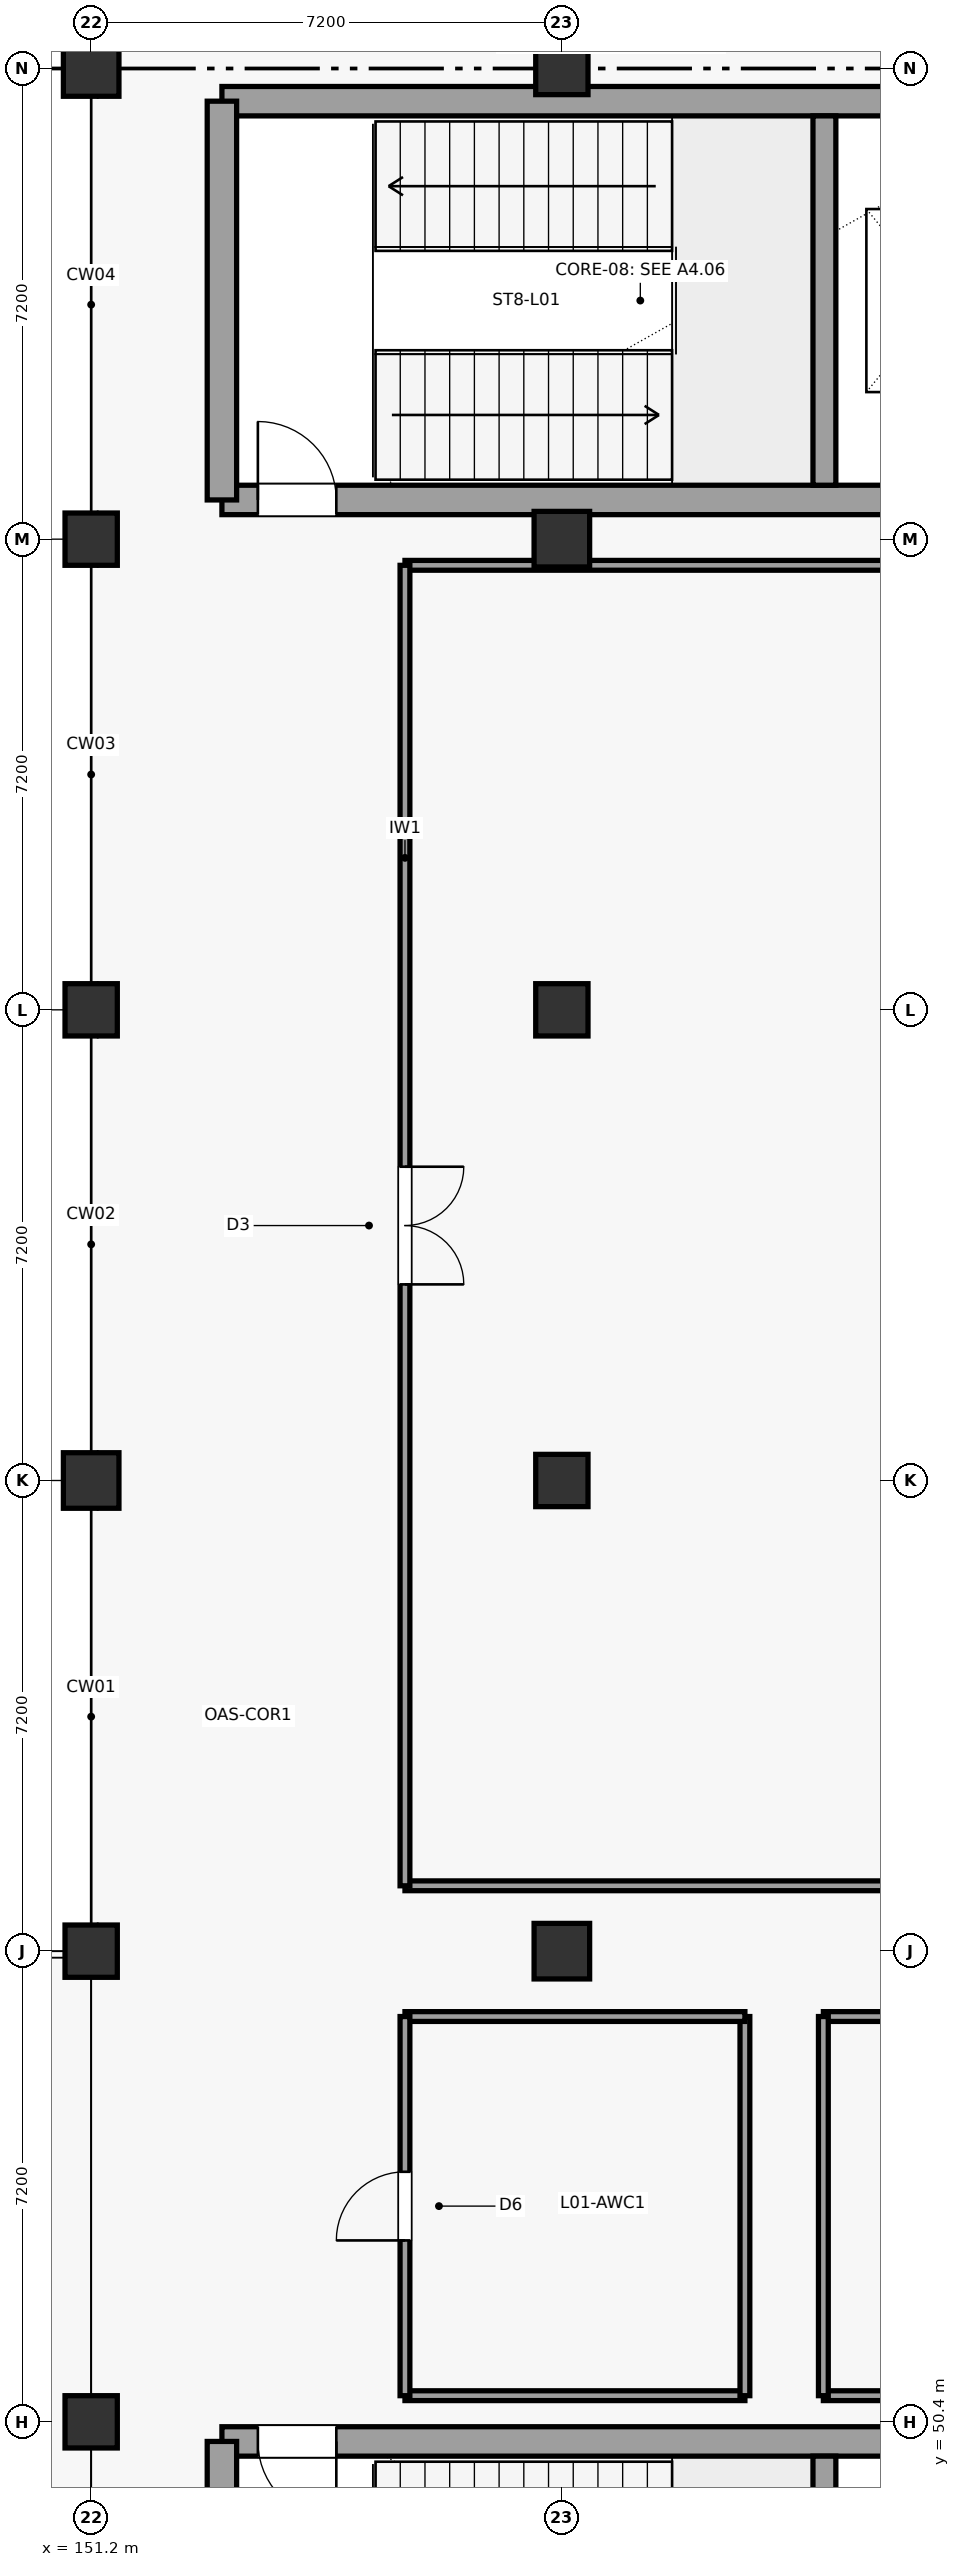
"""IFC4 building model, lengths in metres.
Left out: names, types, materials, properties, quantities, classifications, styles, units other than length and angle.
Written with IfcOpenShell. Run it as: python <this file> out.ifc"""

import sys

from ifc_helpers import new_model, si_unit, direction, frame, frame_2d, origin, origin_2d, place, context, subcontext, project, spatial, rectangle, circle, extrude, element, fill, save


model = new_model("IFC4")
c1 = context("Model", 3, precision=1e-05, world=origin(), true_north=direction((0.0, 1.0)))
c2 = subcontext(c1, "Body", "Model", "MODEL_VIEW")
j1 = project(units=[si_unit("LENGTHUNIT", "METRE"), si_unit("PLANEANGLEUNIT", "RADIAN")], contexts=[c1])
p1 = place(None, origin())
s1 = spatial("IfcSite", under=j1, at=p1, CompositionType="ELEMENT")
p2 = place(p1, origin())
s2 = spatial("IfcBuilding", under=s1, at=p2, CompositionType="ELEMENT")
p3 = place(p2, frame((0.0, 0.0, 5.4)))
s3 = spatial("IfcBuildingStorey", under=s2, at=p3, CompositionType="ELEMENT", Elevation=5.4)
p4 = place(p3, frame((151.2, 50.4, 0.0), z_axis=(0.0, 0.0, 1.0), x_axis=(1.0, 0.0, 0.0)))
e1 = element("IfcColumn", 1, at=p4, inside=s3, PredefinedType="COLUMN", context=c2, shape_type="SweptSolid", body=[
    extrude(rectangle(XDim=0.8, YDim=0.8, at=origin_2d()), origin(), (0.0, 0.0, 1.0), 4.2),
])
p5 = place(p3, frame((151.2, 57.6, 0.0), z_axis=(0.0, 0.0, 1.0), x_axis=(1.0, 0.0, 0.0)))
e2 = element("IfcColumn", 2, at=p5, inside=s3, PredefinedType="COLUMN", context=c2, shape_type="SweptSolid", body=[
    extrude(circle(Radius=0.4, at=origin_2d()), origin(), (0.0, 0.0, 1.0), 4.2),
])
p6 = place(p3, frame((151.2, 64.8, 0.0), z_axis=(0.0, 0.0, 1.0), x_axis=(1.0, 0.0, 0.0)))
e3 = element("IfcColumn", 3, at=p6, inside=s3, PredefinedType="COLUMN", context=c2, shape_type="SweptSolid", body=[
    extrude(rectangle(XDim=0.85, YDim=0.85, at=origin_2d()), origin(), (0.0, 0.0, 1.0), 4.2),
])
p7 = place(p3, frame((151.2, 72.0, 0.0), z_axis=(0.0, 0.0, 1.0), x_axis=(1.0, 0.0, 0.0)))
e4 = element("IfcColumn", 4, at=p7, inside=s3, PredefinedType="COLUMN", context=c2, shape_type="SweptSolid", body=[
    extrude(rectangle(XDim=0.8, YDim=0.8, at=origin_2d()), origin(), (0.0, 0.0, 1.0), 4.2),
])
p8 = place(p3, frame((151.2, 79.2, 0.0), z_axis=(0.0, 0.0, 1.0), x_axis=(1.0, 0.0, 0.0)))
e5 = element("IfcColumn", 5, at=p8, inside=s3, PredefinedType="COLUMN", context=c2, shape_type="SweptSolid", body=[
    extrude(circle(Radius=0.4, at=origin_2d()), origin(), (0.0, 0.0, 1.0), 4.2),
])
for number, where, z_axis, x_axis in (
    (6, (151.2, 86.4, 0.0), (0.0, 0.0, 1.0), (1.0, 0.0, 0.0)),
    (7, (158.4, 57.6, 0.0), (0.0, 0.0, 1.0), (1.0, 0.0, 0.0)),
):
    element("IfcColumn", number, at=place(p3, frame(where, z_axis=z_axis, x_axis=x_axis)), inside=s3, PredefinedType="COLUMN", context=c2, shape_type="SweptSolid", body=[
        extrude(rectangle(XDim=0.85, YDim=0.85, at=origin_2d()), origin(), (0.0, 0.0, 1.0), 4.2),
    ])
p9 = place(p3, frame((158.4, 64.8, 0.0), z_axis=(0.0, 0.0, 1.0), x_axis=(1.0, 0.0, 0.0)))
e8 = element("IfcColumn", 8, at=p9, inside=s3, PredefinedType="COLUMN", context=c2, shape_type="SweptSolid", body=[
    extrude(rectangle(XDim=0.8, YDim=0.8, at=origin_2d()), origin(), (0.0, 0.0, 1.0), 4.2),
])
p10 = place(p3, frame((158.4, 72.0, 0.0), z_axis=(0.0, 0.0, 1.0), x_axis=(1.0, 0.0, 0.0)))
e9 = element("IfcColumn", 9, at=p10, inside=s3, PredefinedType="COLUMN", context=c2, shape_type="SweptSolid", body=[
    extrude(circle(Radius=0.4, at=origin_2d()), origin(), (0.0, 0.0, 1.0), 4.2),
])
p11 = place(p3, frame((158.4, 79.2, 0.0), z_axis=(0.0, 0.0, 1.0), x_axis=(1.0, 0.0, 0.0)))
e10 = element("IfcColumn", 10, at=p11, inside=s3, PredefinedType="COLUMN", context=c2, shape_type="SweptSolid", body=[
    extrude(rectangle(XDim=0.85, YDim=0.85, at=origin_2d()), origin(), (0.0, 0.0, 1.0), 4.2),
])
p12 = place(p3, frame((158.4, 86.4, 0.0), z_axis=(0.0, 0.0, 1.0), x_axis=(1.0, 0.0, 0.0)))
e11 = element("IfcColumn", 11, at=p12, inside=s3, PredefinedType="COLUMN", context=c2, shape_type="SweptSolid", body=[
    extrude(rectangle(XDim=0.8, YDim=0.8, at=origin_2d()), origin(), (0.0, 0.0, 1.0), 4.2),
])
p13 = place(p3, frame((153.2, 50.1, 0.0), z_axis=(0.0, 0.0, 1.0), x_axis=(1.0, 0.0, 0.0)))
e12 = element("IfcWall", 12, at=p13, inside=s3, PredefinedType="SHEAR", context=c2, shape_type="SweptSolid", body=[
    extrude(rectangle(XDim=12.8, YDim=0.45, at=frame_2d((6.4, 0.0))), origin(), (0.0, 0.0, 1.0), 3.92),
])
p14 = place(p13, frame((0.55, 0.0, 0.0)))
e13 = element("IfcOpeningElement", 13, at=p14, cuts=e12, PredefinedType="OPENING", context=c2, shape_type="SweptSolid", body=[
    extrude(rectangle(XDim=1.2, YDim=2.25, at=frame_2d((0.6, 1.125))), frame((0.0, 0.235, 0.0), z_axis=(0.0, -1.0, 0.0), x_axis=(1.0, 0.0, 0.0)), (0.0, 0.0, 1.0), 0.47),
])
p15 = place(p13, frame((10.458, 0.0, 0.0)))
e14 = element("IfcOpeningElement", 14, at=p15, cuts=e12, PredefinedType="OPENING", context=c2, shape_type="SweptSolid", body=[
    extrude(rectangle(XDim=1.1, YDim=2.2, at=frame_2d((0.55, 1.1))), frame((0.0, 0.235, 0.0), z_axis=(0.0, -1.0, 0.0), x_axis=(1.0, 0.0, 0.0)), (0.0, 0.0, 1.0), 0.47),
])
p16 = place(p3, frame((153.2, 44.0, 0.0), z_axis=(0.0, 0.0, 1.0), x_axis=(0.0, 1.0, 0.0)))
e15 = element("IfcWall", 15, at=p16, inside=s3, PredefinedType="SHEAR", context=c2, shape_type="SweptSolid", body=[
    extrude(rectangle(XDim=6.1, YDim=0.45, at=frame_2d((3.05, 0.0))), origin(), (0.0, 0.0, 1.0), 3.92),
])
p17 = place(p3, frame((162.416, 44.225, 0.0), z_axis=(0.0, 0.0, 1.0), x_axis=(0.0, 1.0, 0.0)))
e16 = element("IfcWall", 16, at=p17, inside=s3, PredefinedType="SHEAR", context=c2, shape_type="SweptSolid", body=[
    extrude(rectangle(XDim=5.65, YDim=0.35, at=frame_2d((2.825, 0.0))), origin(), (0.0, 0.0, 1.0), 3.92),
])
p18 = place(p3, frame((153.2, 79.8, 0.0), z_axis=(0.0, 0.0, 1.0), x_axis=(1.0, 0.0, 0.0)))
e17 = element("IfcWall", 17, at=p18, inside=s3, PredefinedType="SHEAR", context=c2, shape_type="SweptSolid", body=[
    extrude(rectangle(XDim=12.8, YDim=0.45, at=frame_2d((6.4, 0.0))), origin(), (0.0, 0.0, 1.0), 3.92),
])
p19 = place(p18, frame((0.55, 0.0, 0.0)))
e18 = element("IfcOpeningElement", 18, at=p19, cuts=e17, PredefinedType="OPENING", context=c2, shape_type="SweptSolid", body=[
    extrude(rectangle(XDim=1.2, YDim=2.25, at=frame_2d((0.6, 1.125))), frame((0.0, 0.235, 0.0), z_axis=(0.0, -1.0, 0.0), x_axis=(1.0, 0.0, 0.0)), (0.0, 0.0, 1.0), 0.47),
])
p20 = place(p18, frame((10.108, 0.0, 0.0)))
e19 = element("IfcOpeningElement", 19, at=p20, cuts=e17, PredefinedType="OPENING", context=c2, shape_type="SweptSolid", body=[
    extrude(rectangle(XDim=1.8, YDim=2.4, at=frame_2d((0.9, 1.2))), frame((0.0, 0.235, 0.0), z_axis=(0.0, -1.0, 0.0), x_axis=(1.0, 0.0, 0.0)), (0.0, 0.0, 1.0), 0.47),
])
p21 = place(p3, frame((153.2, 85.9, 0.0), z_axis=(0.0, 0.0, 1.0), x_axis=(1.0, 0.0, 0.0)))
e20 = element("IfcWall", 20, at=p21, inside=s3, PredefinedType="SHEAR", context=c2, shape_type="SweptSolid", body=[
    extrude(rectangle(XDim=12.8, YDim=0.45, at=frame_2d((6.4, 0.0))), origin(), (0.0, 0.0, 1.0), 3.92),
])
p22 = place(p3, frame((153.2, 79.8, 0.0), z_axis=(0.0, 0.0, 1.0), x_axis=(0.0, 1.0, 0.0)))
e21 = element("IfcWall", 21, at=p22, inside=s3, PredefinedType="SHEAR", context=c2, shape_type="SweptSolid", body=[
    extrude(rectangle(XDim=6.1, YDim=0.45, at=frame_2d((3.05, 0.0))), origin(), (0.0, 0.0, 1.0), 3.92),
])
p23 = place(p3, frame((162.416, 80.025, 0.0), z_axis=(0.0, 0.0, 1.0), x_axis=(0.0, 1.0, 0.0)))
e22 = element("IfcWall", 22, at=p23, inside=s3, PredefinedType="SHEAR", context=c2, shape_type="SweptSolid", body=[
    extrude(rectangle(XDim=5.65, YDim=0.35, at=frame_2d((2.825, 0.0))), origin(), (0.0, 0.0, 1.0), 3.92),
])
for number, where, z_axis, x_axis in (
    (23, (156.0, 58.6, 0.0), (0.0, 0.0, 1.0), (1.0, 0.0, 0.0)),
    (24, (171.4, 78.8, 0.0), (0.0, 0.0, 1.0), (-1.0, 0.0, 0.0)),
):
    element("IfcWall", number, at=place(p3, frame(where, z_axis=z_axis, x_axis=x_axis)), inside=s3, PredefinedType="PARTITIONING", context=c2, shape_type="SweptSolid", body=[
        extrude(rectangle(XDim=15.4, YDim=0.15, at=frame_2d((7.7, 0.0))), origin(), (0.0, 0.0, 1.0), 2.98),
    ])
p24 = place(p3, frame((156.0, 78.8, 0.0), z_axis=(0.0, 0.0, 1.0), x_axis=(0.0, -1.0, 0.0)))
e25 = element("IfcWall", 25, at=p24, inside=s3, PredefinedType="PARTITIONING", context=c2, shape_type="SweptSolid", body=[
    extrude(rectangle(XDim=20.2, YDim=0.15, at=frame_2d((10.1, 0.0))), origin(), (0.0, 0.0, 1.0), 2.98),
])
p25 = place(p24, frame((9.2, 0.0, 0.0)))
e26 = element("IfcOpeningElement", 26, at=p25, cuts=e25, PredefinedType="OPENING", context=c2, shape_type="SweptSolid", body=[
    extrude(rectangle(XDim=1.8, YDim=2.3, at=frame_2d((0.9, 1.15))), frame((0.0, 0.085, 0.0), z_axis=(0.0, -1.0, 0.0), x_axis=(1.0, 0.0, 0.0)), (0.0, 0.0, 1.0), 0.17),
])
p26 = place(p3, frame((156.0, 50.8, 0.0), z_axis=(0.0, 0.0, 1.0), x_axis=(1.0, 0.0, 0.0)))
e27 = element("IfcWall", 27, at=p26, inside=s3, PredefinedType="PARTITIONING", context=c2, shape_type="SweptSolid", body=[
    extrude(rectangle(XDim=5.2, YDim=0.15, at=frame_2d((2.6, 0.0))), origin(), (0.0, 0.0, 1.0), 2.98),
])
p27 = place(p3, frame((161.2, 50.8, 0.0), z_axis=(0.0, 0.0, 1.0), x_axis=(0.0, 1.0, 0.0)))
e28 = element("IfcWall", 28, at=p27, inside=s3, PredefinedType="PARTITIONING", context=c2, shape_type="SweptSolid", body=[
    extrude(rectangle(XDim=5.8, YDim=0.15, at=frame_2d((2.9, 0.0))), origin(), (0.0, 0.0, 1.0), 2.98),
])
p28 = place(p3, frame((161.2, 56.6, 0.0), z_axis=(0.0, 0.0, 1.0), x_axis=(-1.0, 0.0, 0.0)))
e29 = element("IfcWall", 29, at=p28, inside=s3, PredefinedType="PARTITIONING", context=c2, shape_type="SweptSolid", body=[
    extrude(rectangle(XDim=5.2, YDim=0.15, at=frame_2d((2.6, 0.0))), origin(), (0.0, 0.0, 1.0), 2.98),
])
p29 = place(p3, frame((156.0, 56.6, 0.0), z_axis=(0.0, 0.0, 1.0), x_axis=(0.0, -1.0, 0.0)))
e30 = element("IfcWall", 30, at=p29, inside=s3, PredefinedType="PARTITIONING", context=c2, shape_type="SweptSolid", body=[
    extrude(rectangle(XDim=5.8, YDim=0.15, at=frame_2d((2.9, 0.0))), origin(), (0.0, 0.0, 1.0), 2.98),
])
p30 = place(p29, frame((2.375, 0.0, 0.0)))
e31 = element("IfcOpeningElement", 31, at=p30, cuts=e30, PredefinedType="OPENING", context=c2, shape_type="SweptSolid", body=[
    extrude(rectangle(XDim=1.05, YDim=2.2, at=frame_2d((0.525, 1.1))), frame((0.0, 0.085, 0.0), z_axis=(0.0, -1.0, 0.0), x_axis=(1.0, 0.0, 0.0)), (0.0, 0.0, 1.0), 0.17),
])
p31 = place(p3, frame((162.4, 50.8, 0.0), z_axis=(0.0, 0.0, 1.0), x_axis=(1.0, 0.0, 0.0)))
e32 = element("IfcWall", 32, at=p31, inside=s3, PredefinedType="PARTITIONING", context=c2, shape_type="SweptSolid", body=[
    extrude(rectangle(XDim=4.2, YDim=0.15, at=frame_2d((2.1, 0.0))), origin(), (0.0, 0.0, 1.0), 2.98),
])
p32 = place(p31, frame((1.625, 0.0, 0.0)))
e33 = element("IfcOpeningElement", 33, at=p32, cuts=e32, PredefinedType="OPENING", context=c2, shape_type="SweptSolid", body=[
    extrude(rectangle(XDim=0.95, YDim=2.15, at=frame_2d((0.475, 1.075))), frame((0.0, 0.085, 0.0), z_axis=(0.0, -1.0, 0.0), x_axis=(1.0, 0.0, 0.0)), (0.0, 0.0, 1.0), 0.17),
])
p33 = place(p3, frame((166.6, 56.6, 0.0), z_axis=(0.0, 0.0, 1.0), x_axis=(-1.0, 0.0, 0.0)))
e34 = element("IfcWall", 34, at=p33, inside=s3, PredefinedType="PARTITIONING", context=c2, shape_type="SweptSolid", body=[
    extrude(rectangle(XDim=4.2, YDim=0.15, at=frame_2d((2.1, 0.0))), origin(), (0.0, 0.0, 1.0), 2.98),
])
p34 = place(p3, frame((162.4, 56.6, 0.0), z_axis=(0.0, 0.0, 1.0), x_axis=(0.0, -1.0, 0.0)))
e35 = element("IfcWall", 35, at=p34, inside=s3, PredefinedType="PARTITIONING", context=c2, shape_type="SweptSolid", body=[
    extrude(rectangle(XDim=5.8, YDim=0.15, at=frame_2d((2.9, 0.0))), origin(), (0.0, 0.0, 1.0), 2.98),
])
p35 = place(p14, frame((1.2, 0.0, 0.0), z_axis=(0.0, 0.0, 1.0), x_axis=(-1.0, 0.0, 0.0)))
e36 = element("IfcDoor", 36, at=p35, inside=s3, OperationType="SINGLE_SWING_RIGHT", PredefinedType="DOOR", context=c2, shape_type="SweptSolid", body=[
    extrude(rectangle(XDim=1.2, YDim=2.25, at=frame_2d((0.6, 1.125))), frame((0.0, 0.025, 0.0), z_axis=(0.0, -1.0, 0.0), x_axis=(1.0, 0.0, 0.0)), (0.0, 0.0, 1.0), 0.05),
])
fill(e13, e36)
p36 = place(p19, origin())
e37 = element("IfcDoor", 37, at=p36, inside=s3, OperationType="SINGLE_SWING_LEFT", PredefinedType="DOOR", context=c2, shape_type="SweptSolid", body=[
    extrude(rectangle(XDim=1.2, YDim=2.25, at=frame_2d((0.6, 1.125))), frame((0.0, 0.025, 0.0), z_axis=(0.0, -1.0, 0.0), x_axis=(1.0, 0.0, 0.0)), (0.0, 0.0, 1.0), 0.05),
])
fill(e18, e37)
p37 = place(p25, origin())
e38 = element("IfcDoor", 38, at=p37, inside=s3, OperationType="DOUBLE_DOOR_SINGLE_SWING", PredefinedType="DOOR", context=c2, shape_type="SweptSolid", body=[
    extrude(rectangle(XDim=1.8, YDim=2.3, at=frame_2d((0.9, 1.15))), frame((0.0, 0.025, 0.0), z_axis=(0.0, -1.0, 0.0), x_axis=(1.0, 0.0, 0.0)), (0.0, 0.0, 1.0), 0.05),
])
fill(e26, e38)
p38 = place(p30, frame((1.05, 0.0, 0.0), z_axis=(0.0, 0.0, 1.0), x_axis=(-1.0, 0.0, 0.0)))
e39 = element("IfcDoor", 39, at=p38, inside=s3, OperationType="SINGLE_SWING_RIGHT", PredefinedType="DOOR", context=c2, shape_type="SweptSolid", body=[
    extrude(rectangle(XDim=1.05, YDim=2.2, at=frame_2d((0.525, 1.1))), frame((0.0, 0.025, 0.0), z_axis=(0.0, -1.0, 0.0), x_axis=(1.0, 0.0, 0.0)), (0.0, 0.0, 1.0), 0.05),
])
fill(e31, e39)
save(model, sys.argv[1])
